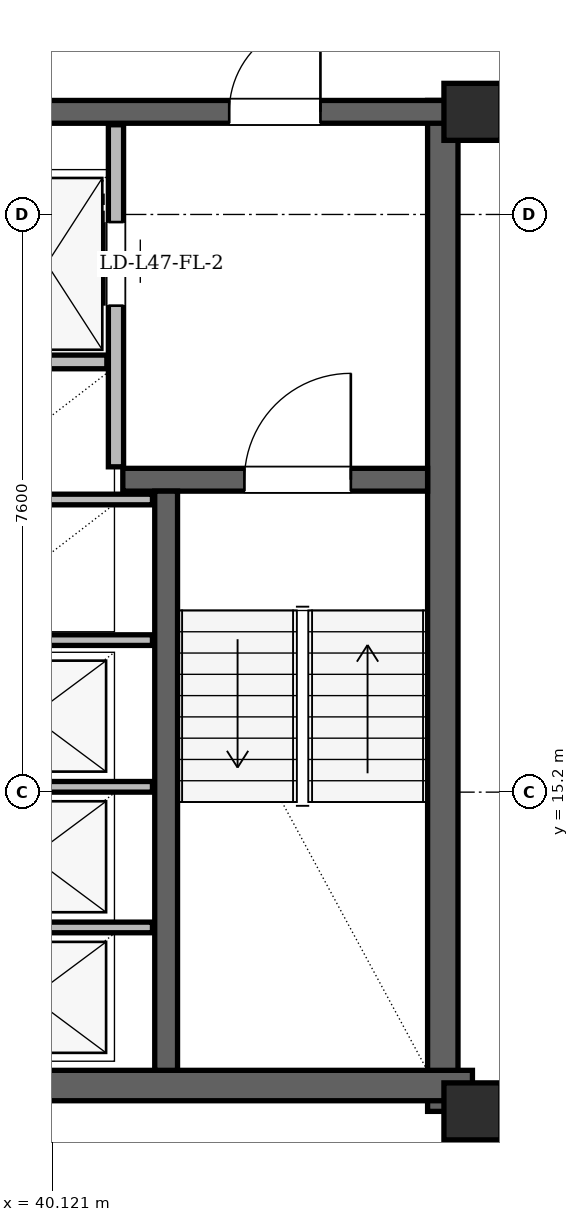
"""IFC4 building model, lengths in metres.
Left out: names, types, materials, properties, quantities, classifications, styles, units other than length and angle.
Written with IfcOpenShell. Run it as: python <this file> out.ifc"""

import sys

from ifc_helpers import new_model, si_unit, direction, frame, frame_2d, origin, origin_2d, place, context, subcontext, project, spatial, rectangle, hollow_rectangle, extrude, element, fill, save


model = new_model("IFC4")
c1 = context("Model", 3, precision=1e-05, world=origin(), true_north=direction((0.0, 1.0)))
c2 = subcontext(c1, "Body", "Model", "MODEL_VIEW")
j1 = project(units=[si_unit("LENGTHUNIT", "METRE"), si_unit("PLANEANGLEUNIT", "RADIAN")], contexts=[c1])
p1 = place(None, origin())
s1 = spatial("IfcSite", under=j1, at=p1, CompositionType="ELEMENT")
p2 = place(p1, origin())
s2 = spatial("IfcBuilding", under=s1, at=p2, CompositionType="ELEMENT")
p3 = place(p2, frame((0.0, 0.0, 178.2)))
s3 = spatial("IfcBuildingStorey", under=s2, at=p3, CompositionType="ELEMENT", Elevation=178.2)
for number, where, z_axis, x_axis in (
    (1, (45.65, 11.0, 0.0), (0.0, 0.0, 1.0), (1.0, 0.0, 0.0)),
    (2, (45.65, 24.15, 0.0), (0.0, 0.0, 1.0), (1.0, 0.0, 0.0)),
):
    element("IfcColumn", number, at=place(p3, frame(where, z_axis=z_axis, x_axis=x_axis)), inside=s3, PredefinedType="COLUMN", context=c2, shape_type="SweptSolid", body=[
        extrude(hollow_rectangle(XDim=0.75, YDim=0.75, WallThickness=0.06, at=origin_2d()), origin(), (0.0, 0.0, 1.0), 3.6),
    ])
p4 = place(p3, frame((45.26, 11.0, 0.0), z_axis=(0.0, 0.0, 1.0), x_axis=(0.0, 1.0, 0.0)))
e3 = element("IfcWall", 3, at=p4, inside=s3, PredefinedType="SHEAR", context=c2, shape_type="SweptSolid", body=[
    extrude(rectangle(XDim=13.3, YDim=0.4, at=frame_2d((6.65, 0.0))), origin(), (0.0, 0.0, 1.0), 3.38),
])
p5 = place(p3, frame((38.55, 11.34, 0.0), z_axis=(0.0, 0.0, 1.0), x_axis=(1.0, 0.0, 0.0)))
e4 = element("IfcWall", 4, at=p5, inside=s3, PredefinedType="SHEAR", context=c2, shape_type="SweptSolid", body=[
    extrude(rectangle(XDim=7.1, YDim=0.4, at=frame_2d((3.55, 0.0))), origin(), (0.0, 0.0, 1.0), 3.38),
])
p6 = place(p3, frame((29.65, 24.15, 0.0), z_axis=(0.0, 0.0, 1.0), x_axis=(1.0, 0.0, 0.0)))
e5 = element("IfcWall", 5, at=p6, inside=s3, PredefinedType="SHEAR", context=c2, shape_type="SweptSolid", body=[
    extrude(rectangle(XDim=15.7, YDim=0.3, at=frame_2d((7.85, 0.0))), origin(), (0.0, 0.0, 1.0), 3.38),
])
p7 = place(p6, frame((1.7, 0.0, 0.0)))
e6 = element("IfcOpeningElement", 6, at=p7, cuts=e5, PredefinedType="OPENING", context=c2, shape_type="SweptSolid", body=[
    extrude(rectangle(XDim=1.2, YDim=2.2, at=frame_2d((0.6, 1.1))), frame((0.0, 0.15, 0.0), z_axis=(0.0, -1.0, 0.0), x_axis=(1.0, 0.0, 0.0)), (0.0, 0.0, 1.0), 0.3),
])
p8 = place(p6, frame((12.8, 0.0, 0.0)))
e7 = element("IfcOpeningElement", 7, at=p8, cuts=e5, PredefinedType="OPENING", context=c2, shape_type="SweptSolid", body=[
    extrude(rectangle(XDim=1.2, YDim=2.2, at=frame_2d((0.6, 1.1))), frame((0.0, 0.15, 0.0), z_axis=(0.0, -1.0, 0.0), x_axis=(1.0, 0.0, 0.0)), (0.0, 0.0, 1.0), 0.3),
])
p9 = place(p6, frame((7.4, 0.0, 0.0)))
e8 = element("IfcOpeningElement", 8, at=p9, cuts=e5, PredefinedType="OPENING", context=c2, shape_type="SweptSolid", body=[
    extrude(rectangle(XDim=0.9, YDim=2.05, at=frame_2d((0.45, 1.025))), frame((0.0, 0.15, 0.0), z_axis=(0.0, -1.0, 0.0), x_axis=(1.0, 0.0, 0.0)), (0.0, 0.0, 1.0), 0.3),
])
p10 = place(p3, frame((41.05, 19.31, 0.0), z_axis=(0.0, 0.0, 1.0), x_axis=(1.0, 0.0, 0.0)))
e9 = element("IfcWall", 9, at=p10, inside=s3, PredefinedType="SHEAR", context=c2, shape_type="SweptSolid", body=[
    extrude(rectangle(XDim=4.01, YDim=0.3, at=frame_2d((2.005, 0.0))), origin(), (0.0, 0.0, 1.0), 3.38),
])
p11 = place(p10, frame((1.6, 0.0, 0.0)))
e10 = element("IfcOpeningElement", 10, at=p11, cuts=e9, PredefinedType="OPENING", context=c2, shape_type="SweptSolid", body=[
    extrude(rectangle(XDim=1.4, YDim=2.2, at=frame_2d((0.7, 1.1))), frame((0.0, 0.15, 0.0), z_axis=(0.0, -1.0, 0.0), x_axis=(1.0, 0.0, 0.0)), (0.0, 0.0, 1.0), 0.3),
])
p12 = place(p3, frame((41.62, 11.54, 0.0), z_axis=(0.0, 0.0, 1.0), x_axis=(0.0, 1.0, 0.0)))
e11 = element("IfcWall", 11, at=p12, inside=s3, PredefinedType="SHEAR", context=c2, shape_type="SweptSolid", body=[
    extrude(rectangle(XDim=7.62, YDim=0.3, at=frame_2d((3.81, 0.0))), origin(), (0.0, 0.0, 1.0), 3.38),
])
p13 = place(p3, frame((59.612, 12.087, 0.0), z_axis=(0.0, 0.0, 1.0), x_axis=(-0.499997641637, 0.866026765382, 0.0)))
e12 = element("IfcWall", 12, at=p13, inside=s3, PredefinedType="SOLIDWALL", context=c2, shape_type="SweptSolid", body=[
    extrude(rectangle(XDim=35.992, YDim=0.29, at=frame_2d((17.996, 0.0))), origin(), (0.0, 0.0, 1.0), 2.6),
])
p14 = place(p13, frame((8.034, 0.0, 0.0)))
e13 = element("IfcOpeningElement", 13, at=p14, cuts=e12, PredefinedType="OPENING", context=c2, shape_type="SweptSolid", body=[
    extrude(rectangle(XDim=1.5, YDim=2.2, at=frame_2d((0.75, 1.1))), frame((0.0, 0.145, 0.0), z_axis=(0.0, -1.0, 0.0), x_axis=(1.0, 0.0, 0.0)), (0.0, 0.0, 1.0), 0.29),
])
p15 = place(p13, frame((31.062, 0.0, 0.0)))
e14 = element("IfcOpeningElement", 14, at=p15, cuts=e12, PredefinedType="OPENING", context=c2, shape_type="SweptSolid", body=[
    extrude(rectangle(XDim=1.5, YDim=2.2, at=frame_2d((0.75, 1.1))), frame((0.0, 0.145, 0.0), z_axis=(0.0, -1.0, 0.0), x_axis=(1.0, 0.0, 0.0)), (0.0, 0.0, 1.0), 0.29),
])
p16 = place(p13, frame((28.16, 0.0, 0.85)))
e15 = element("IfcOpeningElement", 15, at=p16, cuts=e12, PredefinedType="OPENING", context=c2, shape_type="SweptSolid", body=[
    extrude(rectangle(XDim=1.2, YDim=1.48, at=frame_2d((0.6, 0.74))), frame((0.0, 0.145, 0.0), z_axis=(0.0, -1.0, 0.0), x_axis=(1.0, 0.0, 0.0)), (0.0, 0.0, 1.0), 0.29),
])
p17 = place(p13, frame((33.069, 0.0, 0.85)))
e16 = element("IfcOpeningElement", 16, at=p17, cuts=e12, PredefinedType="OPENING", context=c2, shape_type="SweptSolid", body=[
    extrude(rectangle(XDim=1.2, YDim=1.48, at=frame_2d((0.6, 0.74))), frame((0.0, 0.145, 0.0), z_axis=(0.0, -1.0, 0.0), x_axis=(1.0, 0.0, 0.0)), (0.0, 0.0, 1.0), 0.29),
])
p18 = place(p13, frame((14.916, 0.0, 0.85)))
e17 = element("IfcOpeningElement", 17, at=p18, cuts=e12, PredefinedType="OPENING", context=c2, shape_type="SweptSolid", body=[
    extrude(rectangle(XDim=1.4, YDim=1.6, at=frame_2d((0.7, 0.8))), frame((0.0, 0.145, 0.0), z_axis=(0.0, -1.0, 0.0), x_axis=(1.0, 0.0, 0.0)), (0.0, 0.0, 1.0), 0.29),
])
p19 = place(p13, frame((17.971, 0.0, 0.85)))
e18 = element("IfcOpeningElement", 18, at=p19, cuts=e12, PredefinedType="OPENING", context=c2, shape_type="SweptSolid", body=[
    extrude(rectangle(XDim=1.2, YDim=1.48, at=frame_2d((0.6, 0.74))), frame((0.0, 0.145, 0.0), z_axis=(0.0, -1.0, 0.0), x_axis=(1.0, 0.0, 0.0)), (0.0, 0.0, 1.0), 0.29),
])
p20 = place(p13, frame((21.213, 0.0, 0.85)))
e19 = element("IfcOpeningElement", 19, at=p20, cuts=e12, PredefinedType="OPENING", context=c2, shape_type="SweptSolid", body=[
    extrude(rectangle(XDim=1.2, YDim=1.48, at=frame_2d((0.6, 0.74))), frame((0.0, 0.145, 0.0), z_axis=(0.0, -1.0, 0.0), x_axis=(1.0, 0.0, 0.0)), (0.0, 0.0, 1.0), 0.29),
])
p21 = place(p13, frame((26.453, 0.0, 0.85)))
e20 = element("IfcOpeningElement", 20, at=p21, cuts=e12, PredefinedType="OPENING", context=c2, shape_type="SweptSolid", body=[
    extrude(rectangle(XDim=1.2, YDim=1.48, at=frame_2d((0.6, 0.74))), frame((0.0, 0.145, 0.0), z_axis=(0.0, -1.0, 0.0), x_axis=(1.0, 0.0, 0.0)), (0.0, 0.0, 1.0), 0.29),
])
p22 = place(p3, frame((40.96, 19.48, 0.0), z_axis=(0.0, 0.0, 1.0), x_axis=(0.0, 1.0, 0.0)))
e21 = element("IfcWall", 21, at=p22, inside=s3, PredefinedType="PARTITIONING", context=c2, shape_type="SweptSolid", body=[
    extrude(rectangle(XDim=4.5, YDim=0.2, at=frame_2d((2.25, 0.0))), origin(), (0.0, 0.0, 1.0), 3.38),
])
p23 = place(p22, frame((2.12, 0.0, 0.0)))
e22 = element("IfcOpeningElement", 22, at=p23, cuts=e21, PredefinedType="OPENING", context=c2, shape_type="SweptSolid", body=[
    extrude(rectangle(XDim=1.1, YDim=2.2, at=frame_2d((0.55, 1.1))), frame((0.0, 0.1, 0.0), z_axis=(0.0, -1.0, 0.0), x_axis=(1.0, 0.0, 0.0)), (0.0, 0.0, 1.0), 0.2),
])
p24 = place(p3, frame((39.26, 20.86, 0.0), z_axis=(0.0, 0.0, 1.0), x_axis=(1.0, 0.0, 0.0)))
e23 = element("IfcWall", 23, at=p24, inside=s3, PredefinedType="PARTITIONING", context=c2, shape_type="SweptSolid", body=[
    extrude(rectangle(XDim=1.58, YDim=0.18, at=frame_2d((0.79, 0.0))), origin(), (0.0, 0.0, 1.0), 3.38),
])
for number, where, z_axis, x_axis in (
    (24, (38.78, 13.42, 0.0), (0.0, 0.0, 1.0), (1.0, 0.0, 0.0)),
    (25, (38.78, 15.27, 0.0), (0.0, 0.0, 1.0), (1.0, 0.0, 0.0)),
    (26, (38.78, 17.2, 0.0), (0.0, 0.0, 1.0), (1.0, 0.0, 0.0)),
    (27, (38.78, 19.05, 0.0), (0.0, 0.0, 1.0), (1.0, 0.0, 0.0)),
):
    element("IfcWall", number, at=place(p3, frame(where, z_axis=z_axis, x_axis=x_axis)), inside=s3, PredefinedType="PARTITIONING", context=c2, shape_type="SweptSolid", body=[
        extrude(rectangle(XDim=2.66, YDim=0.14, at=frame_2d((1.33, 0.0))), origin(), (0.0, 0.0, 1.0), 3.38),
    ])
p25 = place(p23, origin())
e28 = element("IfcDoor", 28, at=p25, inside=s3, OperationType="SLIDING_TO_RIGHT", PredefinedType="DOOR", context=c2, shape_type="SweptSolid", body=[
    extrude(rectangle(XDim=1.1, YDim=2.2, at=frame_2d((0.55, 1.1))), frame((0.0, 0.025, 0.0), z_axis=(0.0, -1.0, 0.0), x_axis=(1.0, 0.0, 0.0)), (0.0, 0.0, 1.0), 0.05),
])
fill(e22, e28)
p26 = place(p11, origin())
e29 = element("IfcDoor", 29, at=p26, inside=s3, OperationType="SINGLE_SWING_RIGHT", PredefinedType="DOOR", context=c2, shape_type="SweptSolid", body=[
    extrude(rectangle(XDim=1.4, YDim=2.2, at=frame_2d((0.7, 1.1))), frame((0.0, 0.025, 0.0), z_axis=(0.0, -1.0, 0.0), x_axis=(1.0, 0.0, 0.0)), (0.0, 0.0, 1.0), 0.05),
])
fill(e10, e29)
p27 = place(p8, origin())
e30 = element("IfcDoor", 30, at=p27, inside=s3, OperationType="SINGLE_SWING_RIGHT", PredefinedType="DOOR", context=c2, shape_type="SweptSolid", body=[
    extrude(rectangle(XDim=1.2, YDim=2.2, at=frame_2d((0.6, 1.1))), frame((0.0, 0.025, 0.0), z_axis=(0.0, -1.0, 0.0), x_axis=(1.0, 0.0, 0.0)), (0.0, 0.0, 1.0), 0.05),
])
fill(e7, e30)
save(model, sys.argv[1])
